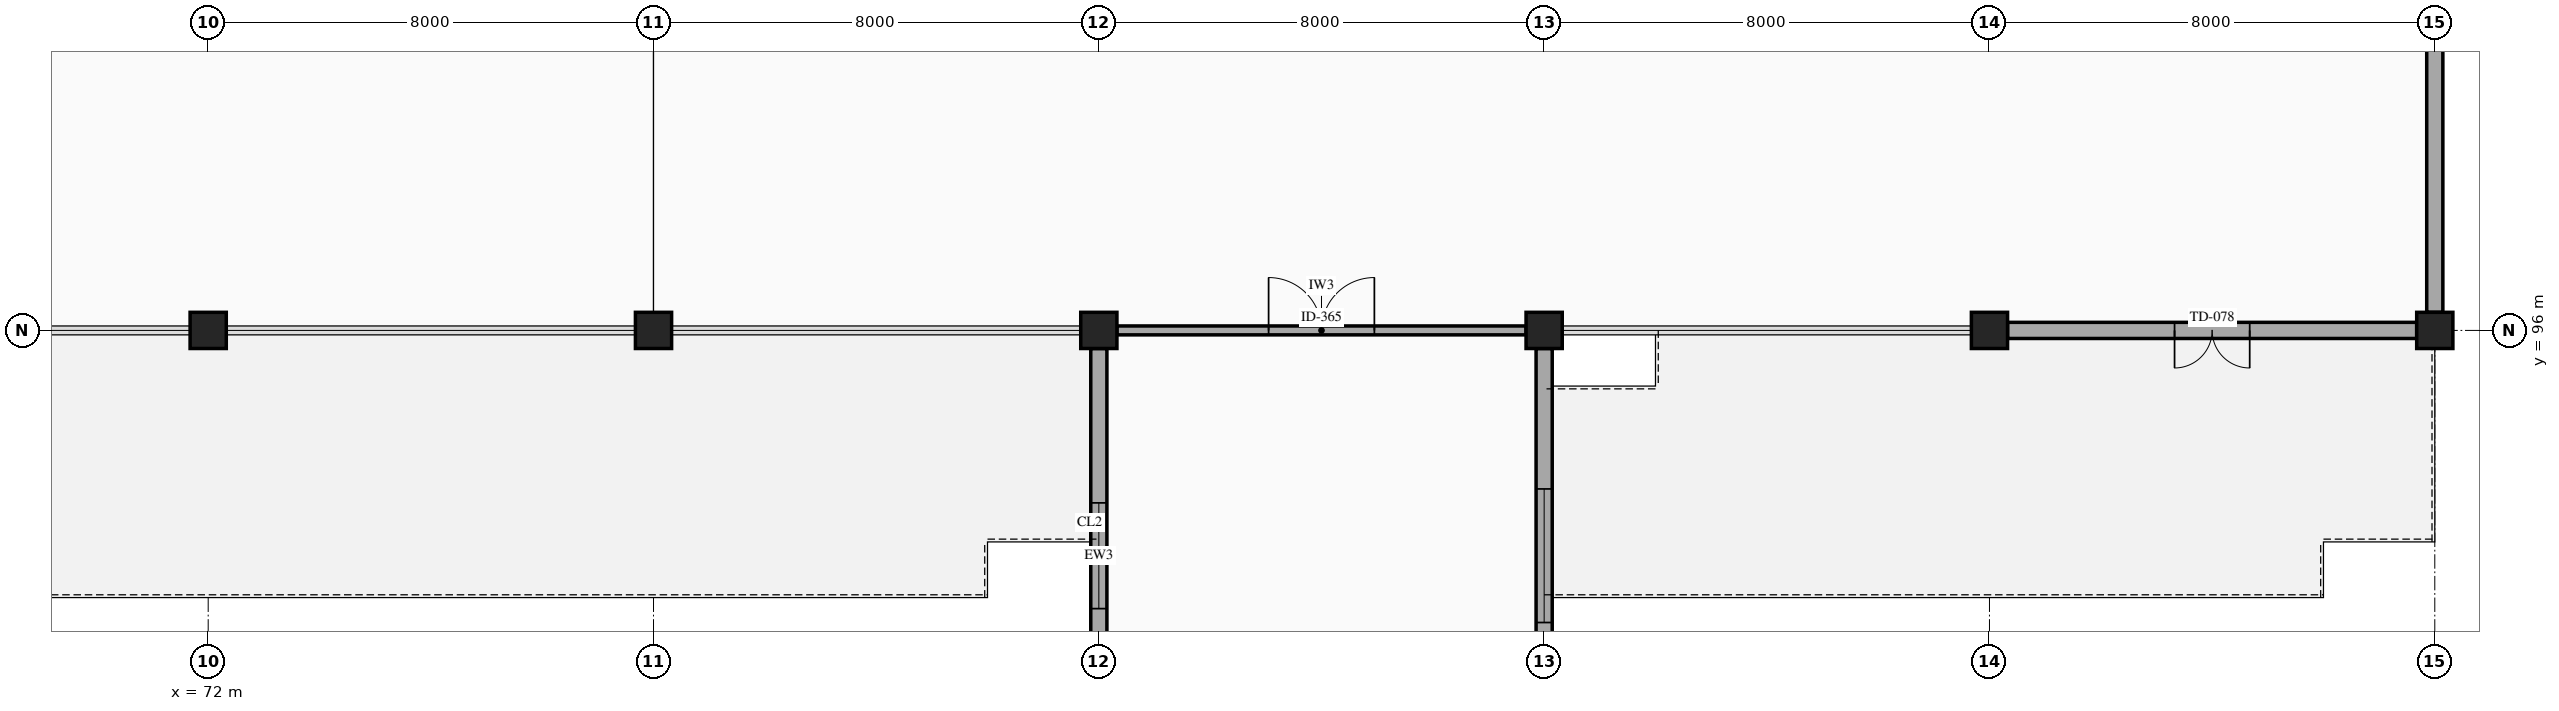
"""IFC4 building model, lengths in metres.
Left out: names, types, materials, properties, quantities, classifications, styles, units other than length and angle.
Written with IfcOpenShell. Run it as: python <this file> out.ifc"""

import sys

from ifc_helpers import new_model, si_unit, direction, frame, frame_2d, origin, origin_2d, place, context, subcontext, project, spatial, rectangle, extrude, element, fill, save


model = new_model("IFC4")
c1 = context("Model", 3, precision=1e-05, world=origin(), true_north=direction((0.0, 1.0)))
c2 = subcontext(c1, "Body", "Model", "MODEL_VIEW")
j1 = project(units=[si_unit("LENGTHUNIT", "METRE"), si_unit("PLANEANGLEUNIT", "RADIAN")], contexts=[c1])
p1 = place(None, origin())
s1 = spatial("IfcSite", under=j1, at=p1, CompositionType="ELEMENT")
p2 = place(p1, origin())
s2 = spatial("IfcBuilding", under=s1, at=p2, CompositionType="ELEMENT")
p3 = place(p2, frame((0.0, 0.0, 23.9)))
s3 = spatial("IfcBuildingStorey", under=s2, at=p3, CompositionType="ELEMENT", Elevation=23.9)
for number, where, z_axis, x_axis in (
    (1, (72.0, 96.0, 0.0), (0.0, 0.0, 1.0), (1.0, 0.0, 0.0)),
    (2, (80.0, 96.0, 0.0), (0.0, 0.0, 1.0), (1.0, 0.0, 0.0)),
    (3, (88.0, 96.0, 0.0), (0.0, 0.0, 1.0), (1.0, 0.0, 0.0)),
    (4, (96.0, 96.0, 0.0), (0.0, 0.0, 1.0), (1.0, 0.0, 0.0)),
    (5, (104.0, 96.0, 0.0), (0.0, 0.0, 1.0), (1.0, 0.0, 0.0)),
    (6, (112.0, 96.0, 0.0), (0.0, 0.0, 1.0), (1.0, 0.0, 0.0)),
):
    element("IfcColumn", number, at=place(p3, frame(where, z_axis=z_axis, x_axis=x_axis)), inside=s3, PredefinedType="COLUMN", context=c2, shape_type="SweptSolid", body=[
        extrude(rectangle(XDim=0.65, YDim=0.65, at=origin_2d()), origin(), (0.0, 0.0, 1.0), 4.5),
    ])
p4 = place(p3, frame((88.0, 88.229, 0.0), z_axis=(0.0, 0.0, 1.0), x_axis=(0.0, 1.0, 0.0)))
e7 = element("IfcWall", 7, at=p4, inside=s3, PredefinedType="STANDARD", context=c2, shape_type="SweptSolid", body=[
    extrude(rectangle(XDim=7.447, YDim=0.29, at=frame_2d((3.723, 0.0))), origin(), (0.0, 0.0, 1.0), 3.48),
])
p5 = place(p4, frame((2.773, 0.0, 0.8)))
e8 = element("IfcOpeningElement", 8, at=p5, cuts=e7, PredefinedType="OPENING", context=c2, shape_type="SweptSolid", body=[
    extrude(rectangle(XDim=1.9, YDim=1.85, at=frame_2d((0.95, 0.925))), frame((0.0, 0.155, 0.0), z_axis=(0.0, -1.0, 0.0), x_axis=(1.0, 0.0, 0.0)), (0.0, 0.0, 1.0), 0.31),
])
p6 = place(p3, frame((112.0, 103.675, 0.0), z_axis=(0.0, 0.0, 1.0), x_axis=(0.0, -1.0, 0.0)))
e9 = element("IfcWall", 9, at=p6, inside=s3, PredefinedType="STANDARD", context=c2, shape_type="SweptSolid", body=[
    extrude(rectangle(XDim=7.35, YDim=0.29, at=frame_2d((3.675, 0.0))), origin(), (0.0, 0.0, 1.0), 3.48),
])
p7 = place(p3, frame((111.675, 96.0, 0.0), z_axis=(0.0, 0.0, 1.0), x_axis=(-1.0, 0.0, 0.0)))
e10 = element("IfcWall", 10, at=p7, inside=s3, PredefinedType="STANDARD", context=c2, shape_type="SweptSolid", body=[
    extrude(rectangle(XDim=7.35, YDim=0.29, at=frame_2d((3.675, 0.0))), origin(), (0.0, 0.0, 1.0), 3.48),
])
p8 = place(p7, frame((3.0, 0.0, 0.0)))
e11 = element("IfcOpeningElement", 11, at=p8, cuts=e10, PredefinedType="OPENING", context=c2, shape_type="SweptSolid", body=[
    extrude(rectangle(XDim=1.35, YDim=2.1, at=frame_2d((0.675, 1.05))), frame((0.0, 0.155, 0.0), z_axis=(0.0, -1.0, 0.0), x_axis=(1.0, 0.0, 0.0)), (0.0, 0.0, 1.0), 0.31),
])
p9 = place(p3, frame((96.0, 95.675, 0.0), z_axis=(0.0, 0.0, 1.0), x_axis=(0.0, -1.0, 0.0)))
e12 = element("IfcWall", 12, at=p9, inside=s3, PredefinedType="STANDARD", context=c2, shape_type="SweptSolid", body=[
    extrude(rectangle(XDim=7.447, YDim=0.29, at=frame_2d((3.723, 0.0))), origin(), (0.0, 0.0, 1.0), 3.48),
])
p10 = place(p9, frame((2.523, 0.0, 0.8)))
e13 = element("IfcOpeningElement", 13, at=p10, cuts=e12, PredefinedType="OPENING", context=c2, shape_type="SweptSolid", body=[
    extrude(rectangle(XDim=2.4, YDim=1.8, at=frame_2d((1.2, 0.9))), frame((0.0, 0.155, 0.0), z_axis=(0.0, -1.0, 0.0), x_axis=(1.0, 0.0, 0.0)), (0.0, 0.0, 1.0), 0.31),
])
p11 = place(p3, frame((88.325, 96.0, 0.0), z_axis=(0.0, 0.0, 1.0), x_axis=(1.0, 0.0, 0.0)))
e14 = element("IfcWall", 14, at=p11, inside=s3, PredefinedType="PARTITIONING", context=c2, shape_type="SweptSolid", body=[
    extrude(rectangle(XDim=7.35, YDim=0.16, at=frame_2d((3.675, 0.0))), origin(), (0.0, 0.0, 1.0), 3.48),
])
p12 = place(p11, frame((2.725, 0.0, 0.0)))
e15 = element("IfcOpeningElement", 15, at=p12, cuts=e14, PredefinedType="OPENING", context=c2, shape_type="SweptSolid", body=[
    extrude(rectangle(XDim=1.9, YDim=2.3, at=frame_2d((0.95, 1.15))), frame((0.0, 0.09, 0.0), z_axis=(0.0, -1.0, 0.0), x_axis=(1.0, 0.0, 0.0)), (0.0, 0.0, 1.0), 0.18),
])
p13 = place(p5, origin())
e16 = element("IfcWindow", 16, at=p13, inside=s3, PartitioningType="SINGLE_PANEL", PredefinedType="WINDOW", context=c2, shape_type="SweptSolid", body=[
    extrude(rectangle(XDim=1.9, YDim=1.85, at=frame_2d((0.95, 0.925))), frame((0.0, 0.03, 0.0), z_axis=(0.0, -1.0, 0.0), x_axis=(1.0, 0.0, 0.0)), (0.0, 0.0, 1.0), 0.06),
])
fill(e8, e16)
p14 = place(p8, origin())
e17 = element("IfcDoor", 17, at=p14, inside=s3, OperationType="DOUBLE_DOOR_SINGLE_SWING", PredefinedType="DOOR", context=c2, shape_type="SweptSolid", body=[
    extrude(rectangle(XDim=1.35, YDim=2.1, at=frame_2d((0.675, 1.05))), frame((0.0, 0.025, 0.0), z_axis=(0.0, -1.0, 0.0), x_axis=(1.0, 0.0, 0.0)), (0.0, 0.0, 1.0), 0.05),
])
fill(e11, e17)
p15 = place(p10, origin())
e18 = element("IfcWindow", 18, at=p15, inside=s3, PartitioningType="DOUBLE_PANEL_VERTICAL", PredefinedType="WINDOW", context=c2, shape_type="SweptSolid", body=[
    extrude(rectangle(XDim=2.4, YDim=1.8, at=frame_2d((1.2, 0.9))), frame((0.0, 0.03, 0.0), z_axis=(0.0, -1.0, 0.0), x_axis=(1.0, 0.0, 0.0)), (0.0, 0.0, 1.0), 0.06),
])
fill(e13, e18)
p16 = place(p12, origin())
e19 = element("IfcDoor", 19, at=p16, inside=s3, OperationType="DOUBLE_DOOR_SINGLE_SWING", PredefinedType="DOOR", context=c2, shape_type="SweptSolid", body=[
    extrude(rectangle(XDim=1.9, YDim=2.3, at=frame_2d((0.95, 1.15))), frame((0.0, 0.025, 0.0), z_axis=(0.0, -1.0, 0.0), x_axis=(1.0, 0.0, 0.0)), (0.0, 0.0, 1.0), 0.05),
])
fill(e15, e19)
save(model, sys.argv[1])
